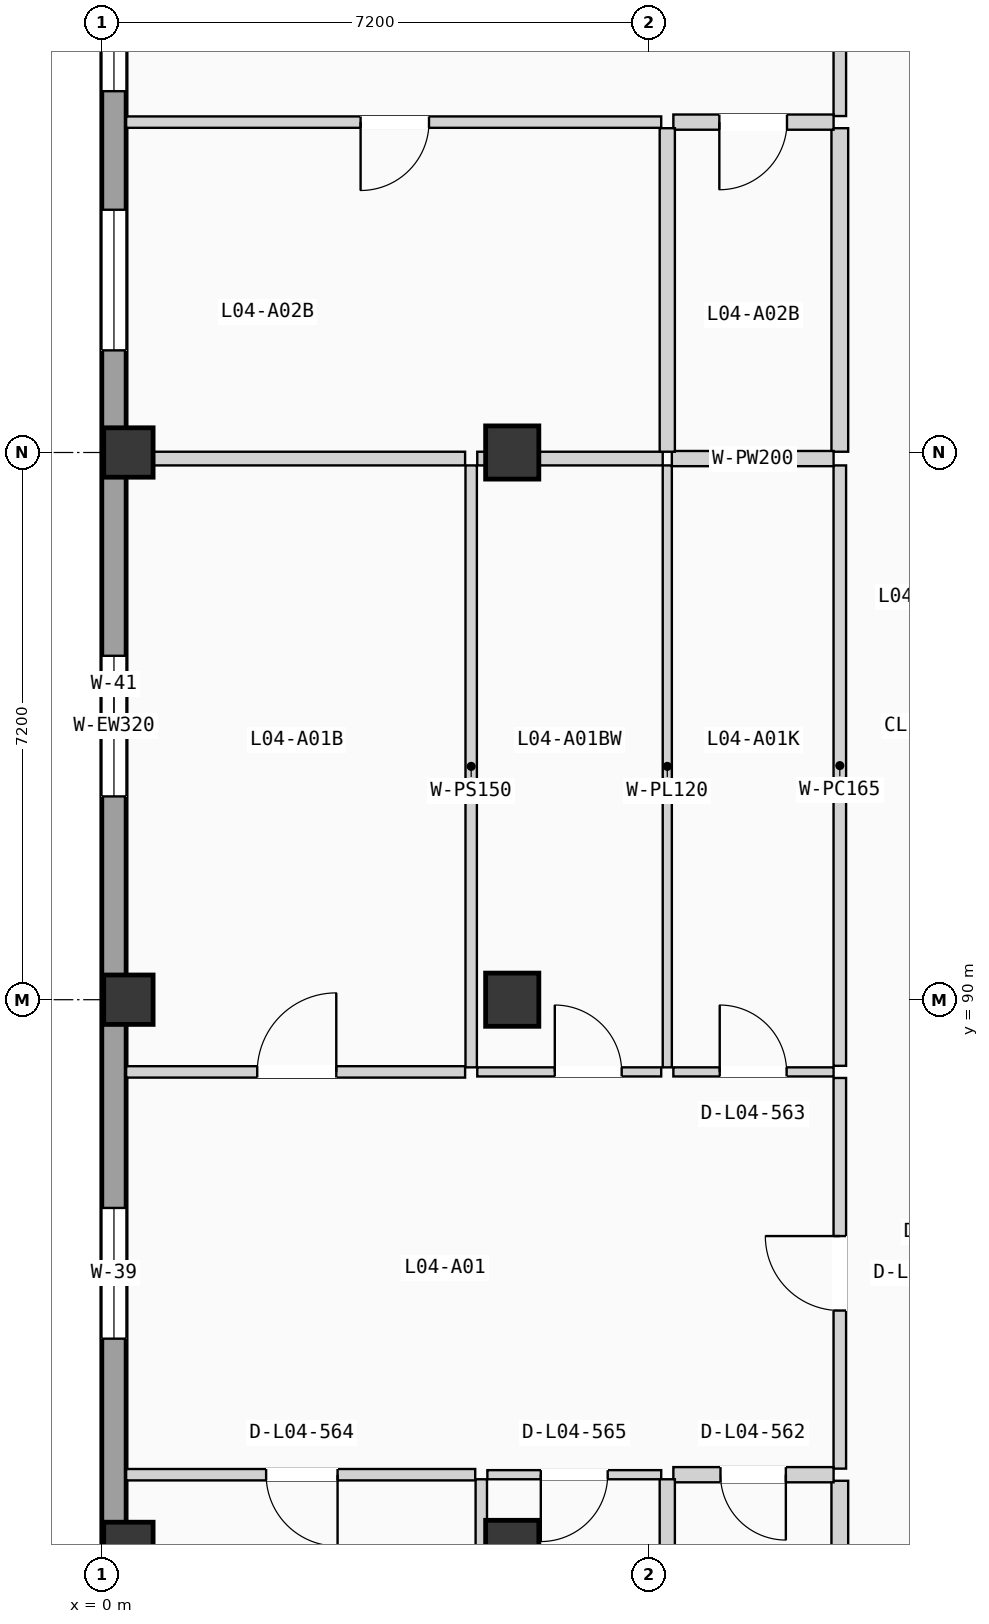
"""IFC4 building model, lengths in metres.
Left out: names, types, materials, properties, quantities, classifications, styles, units other than length and angle.
Written with IfcOpenShell. Run it as: python <this file> out.ifc"""

import sys

from ifc_helpers import new_model, si_unit, direction, frame, frame_2d, origin, origin_2d, place, context, subcontext, project, spatial, rectangle, extrude, element, fill, save


model = new_model("IFC4")
c1 = context("Model", 3, precision=1e-05, world=origin(), true_north=direction((0.0, 1.0)))
c2 = subcontext(c1, "Body", "Model", "MODEL_VIEW")
j1 = project(units=[si_unit("LENGTHUNIT", "METRE"), si_unit("PLANEANGLEUNIT", "RADIAN")], contexts=[c1])
p1 = place(None, origin())
s1 = spatial("IfcSite", under=j1, at=p1, CompositionType="ELEMENT")
p2 = place(p1, origin())
s2 = spatial("IfcBuilding", under=s1, at=p2, CompositionType="ELEMENT")
p3 = place(p2, frame((0.0, 0.0, 15.225)))
s3 = spatial("IfcBuildingStorey", under=s2, at=p3, CompositionType="ELEMENT", Elevation=15.225)
for number, where, z_axis, x_axis in (
    (1, (0.35, 82.8, 0.0), (0.0, 0.0, 1.0), (1.0, 0.0, 0.0)),
    (2, (0.35, 90.0, 0.0), (0.0, 0.0, 1.0), (1.0, 0.0, 0.0)),
    (3, (0.35, 97.2, 0.0), (0.0, 0.0, 1.0), (1.0, 0.0, 0.0)),
):
    element("IfcColumn", number, at=place(p3, frame(where, z_axis=z_axis, x_axis=x_axis)), inside=s3, PredefinedType="COLUMN", context=c2, shape_type="SweptSolid", body=[
        extrude(rectangle(XDim=0.65, YDim=0.65, at=origin_2d()), origin(), (0.0, 0.0, 1.0), 3.15),
    ])
for number, where, z_axis, x_axis in (
    (4, (5.4, 82.8, 0.0), (0.0, 0.0, 1.0), (1.0, 0.0, 0.0)),
    (5, (5.4, 90.0, 0.0), (0.0, 0.0, 1.0), (1.0, 0.0, 0.0)),
    (6, (5.4, 97.2, 0.0), (0.0, 0.0, 1.0), (1.0, 0.0, 0.0)),
):
    element("IfcColumn", number, at=place(p3, frame(where, z_axis=z_axis, x_axis=x_axis)), inside=s3, PredefinedType="COLUMN", context=c2, shape_type="SweptSolid", body=[
        extrude(rectangle(XDim=0.7, YDim=0.7, at=origin_2d()), origin(), (0.0, 0.0, 1.0), 3.15),
    ])
p4 = place(p3, frame((0.16, 68.72, 0.0), z_axis=(0.0, 0.0, 1.0), x_axis=(0.0, 1.0, 0.0)))
e7 = element("IfcWall", 7, at=p4, inside=s3, PredefinedType="SOLIDWALL", context=c2, shape_type="SweptSolid", body=[
    extrude(rectangle(XDim=49.76, YDim=0.32, at=frame_2d((24.88, 0.0))), origin(), (0.0, 0.0, 1.0), 2.89),
])
p5 = place(p4, frame((16.82, 0.0, 0.555)))
e8 = element("IfcOpeningElement", 8, at=p5, cuts=e7, PredefinedType="OPENING", context=c2, shape_type="SweptSolid", body=[
    extrude(rectangle(XDim=1.72, YDim=1.65, at=frame_2d((0.86, 0.825))), frame((0.0, 0.17, 0.0), z_axis=(0.0, -1.0, 0.0), x_axis=(1.0, 0.0, 0.0)), (0.0, 0.0, 1.0), 0.34),
])
p6 = place(p4, frame((10.07, 0.0, 0.85)))
e9 = element("IfcOpeningElement", 9, at=p6, cuts=e7, PredefinedType="OPENING", context=c2, shape_type="SweptSolid", body=[
    extrude(rectangle(XDim=0.95, YDim=1.2, at=frame_2d((0.475, 0.6))), frame((0.0, 0.17, 0.0), z_axis=(0.0, -1.0, 0.0), x_axis=(1.0, 0.0, 0.0)), (0.0, 0.0, 1.0), 0.34),
])
p7 = place(p4, frame((23.955, 0.0, 0.9)))
e10 = element("IfcOpeningElement", 10, at=p7, cuts=e7, PredefinedType="OPENING", context=c2, shape_type="SweptSolid", body=[
    extrude(rectangle(XDim=1.85, YDim=1.2, at=frame_2d((0.925, 0.6))), frame((0.0, 0.17, 0.0), z_axis=(0.0, -1.0, 0.0), x_axis=(1.0, 0.0, 0.0)), (0.0, 0.0, 1.0), 0.34),
])
p8 = place(p4, frame((33.234, 0.0, 0.855)))
e11 = element("IfcOpeningElement", 11, at=p8, cuts=e7, PredefinedType="OPENING", context=c2, shape_type="SweptSolid", body=[
    extrude(rectangle(XDim=1.85, YDim=1.35, at=frame_2d((0.925, 0.675))), frame((0.0, 0.17, 0.0), z_axis=(0.0, -1.0, 0.0), x_axis=(1.0, 0.0, 0.0)), (0.0, 0.0, 1.0), 0.34),
])
p9 = place(p4, frame((29.824, 0.0, 0.705)))
e12 = element("IfcOpeningElement", 12, at=p9, cuts=e7, PredefinedType="OPENING", context=c2, shape_type="SweptSolid", body=[
    extrude(rectangle(XDim=1.85, YDim=1.5, at=frame_2d((0.925, 0.75))), frame((0.0, 0.17, 0.0), z_axis=(0.0, -1.0, 0.0), x_axis=(1.0, 0.0, 0.0)), (0.0, 0.0, 1.0), 0.34),
])
p10 = place(p4, frame((39.427, 0.0, 0.555)))
e13 = element("IfcOpeningElement", 13, at=p10, cuts=e7, PredefinedType="OPENING", context=c2, shape_type="SweptSolid", body=[
    extrude(rectangle(XDim=1.85, YDim=1.65, at=frame_2d((0.925, 0.825))), frame((0.0, 0.17, 0.0), z_axis=(0.0, -1.0, 0.0), x_axis=(1.0, 0.0, 0.0)), (0.0, 0.0, 1.0), 0.34),
])
p11 = place(p3, frame((9.71, 83.83, 0.0), z_axis=(0.0, 0.0, 1.0), x_axis=(0.0, 1.0, 0.0)))
e14 = element("IfcWall", 14, at=p11, inside=s3, PredefinedType="PARTITIONING", context=c2, shape_type="SweptSolid", body=[
    extrude(rectangle(XDim=5.14, YDim=0.165, at=frame_2d((2.57, 0.0))), origin(), (0.0, 0.0, 1.0), 2.87),
])
p12 = place(p11, frame((2.08, 0.0, 0.0)))
e15 = element("IfcOpeningElement", 15, at=p12, cuts=e14, PredefinedType="OPENING", context=c2, shape_type="SweptSolid", body=[
    extrude(rectangle(XDim=0.98, YDim=2.08, at=frame_2d((0.49, 1.04))), frame((0.0, 0.093, 0.0), z_axis=(0.0, -1.0, 0.0), x_axis=(1.0, 0.0, 0.0)), (0.0, 0.0, 1.0), 0.185),
])
p13 = place(p3, frame((9.71, 76.0, 0.0), z_axis=(0.0, 0.0, 1.0), x_axis=(0.0, 1.0, 0.0)))
e16 = element("IfcWall", 16, at=p13, inside=s3, PredefinedType="PLUMBINGWALL", context=c2, shape_type="SweptSolid", body=[
    extrude(rectangle(XDim=7.67, YDim=0.22, at=frame_2d((3.835, 0.0))), origin(), (0.0, 0.0, 1.0), 2.87),
])
p14 = place(p3, frame((9.71, 89.13, 0.0), z_axis=(0.0, 0.0, 1.0), x_axis=(0.0, 1.0, 0.0)))
e17 = element("IfcWall", 17, at=p14, inside=s3, PredefinedType="PARTITIONING", context=c2, shape_type="SweptSolid", body=[
    extrude(rectangle(XDim=7.9, YDim=0.165, at=frame_2d((3.95, 0.0))), origin(), (0.0, 0.0, 1.0), 2.87),
])
p15 = place(p3, frame((9.71, 101.627, 0.0), z_axis=(0.0, 0.0, 1.0), x_axis=(0.0, 1.0, 0.0)))
e18 = element("IfcWall", 18, at=p15, inside=s3, PredefinedType="PARTITIONING", context=c2, shape_type="SweptSolid", body=[
    extrude(rectangle(XDim=5.156, YDim=0.165, at=frame_2d((2.578, 0.0))), origin(), (0.0, 0.0, 1.0), 2.87),
])
p16 = place(p15, frame((2.088, 0.0, 0.0)))
e19 = element("IfcOpeningElement", 19, at=p16, cuts=e18, PredefinedType="OPENING", context=c2, shape_type="SweptSolid", body=[
    extrude(rectangle(XDim=0.98, YDim=2.08, at=frame_2d((0.49, 1.04))), frame((0.0, 0.093, 0.0), z_axis=(0.0, -1.0, 0.0), x_axis=(1.0, 0.0, 0.0)), (0.0, 0.0, 1.0), 0.185),
])
p17 = place(p3, frame((9.71, 97.21, 0.0), z_axis=(0.0, 0.0, 1.0), x_axis=(0.0, 1.0, 0.0)))
e20 = element("IfcWall", 20, at=p17, inside=s3, PredefinedType="PLUMBINGWALL", context=c2, shape_type="SweptSolid", body=[
    extrude(rectangle(XDim=4.257, YDim=0.22, at=frame_2d((2.128, 0.0))), origin(), (0.0, 0.0, 1.0), 2.87),
])
p18 = place(p3, frame((7.52, 83.75, 0.0), z_axis=(0.0, 0.0, 1.0), x_axis=(1.0, 0.0, 0.0)))
e21 = element("IfcWall", 21, at=p18, inside=s3, PredefinedType="PLUMBINGWALL", context=c2, shape_type="SweptSolid", body=[
    extrude(rectangle(XDim=2.108, YDim=0.2, at=frame_2d((1.054, 0.0))), origin(), (0.0, 0.0, 1.0), 2.87),
])
p19 = place(p18, frame((0.62, 0.0, 0.0)))
e22 = element("IfcOpeningElement", 22, at=p19, cuts=e21, PredefinedType="OPENING", context=c2, shape_type="SweptSolid", body=[
    extrude(rectangle(XDim=0.86, YDim=2.0, at=frame_2d((0.43, 1.0))), frame((0.0, 0.11, 0.0), z_axis=(0.0, -1.0, 0.0), x_axis=(1.0, 0.0, 0.0)), (0.0, 0.0, 1.0), 0.22),
])
p20 = place(p3, frame((7.52, 89.05, 0.0), z_axis=(0.0, 0.0, 1.0), x_axis=(1.0, 0.0, 0.0)))
e23 = element("IfcWall", 23, at=p20, inside=s3, PredefinedType="PARTITIONING", context=c2, shape_type="SweptSolid", body=[
    extrude(rectangle(XDim=2.108, YDim=0.12, at=frame_2d((1.054, 0.0))), origin(), (0.0, 0.0, 1.0), 2.87),
])
p21 = place(p20, frame((0.61, 0.0, 0.0)))
e24 = element("IfcOpeningElement", 24, at=p21, cuts=e23, PredefinedType="OPENING", context=c2, shape_type="SweptSolid", body=[
    extrude(rectangle(XDim=0.88, YDim=2.02, at=frame_2d((0.44, 1.01))), frame((0.0, 0.07, 0.0), z_axis=(0.0, -1.0, 0.0), x_axis=(1.0, 0.0, 0.0)), (0.0, 0.0, 1.0), 0.14),
])
p22 = place(p3, frame((0.32, 83.75, 0.0), z_axis=(0.0, 0.0, 1.0), x_axis=(1.0, 0.0, 0.0)))
e25 = element("IfcWall", 25, at=p22, inside=s3, PredefinedType="PARTITIONING", context=c2, shape_type="SweptSolid", body=[
    extrude(rectangle(XDim=4.593, YDim=0.15, at=frame_2d((2.296, 0.0))), origin(), (0.0, 0.0, 1.0), 2.87),
])
p23 = place(p22, frame((1.842, 0.0, 0.0)))
e26 = element("IfcOpeningElement", 26, at=p23, cuts=e25, PredefinedType="OPENING", context=c2, shape_type="SweptSolid", body=[
    extrude(rectangle(XDim=0.94, YDim=2.06, at=frame_2d((0.47, 1.03))), frame((0.0, 0.085, 0.0), z_axis=(0.0, -1.0, 0.0), x_axis=(1.0, 0.0, 0.0)), (0.0, 0.0, 1.0), 0.17),
])
p24 = place(p3, frame((5.073, 83.75, 0.0), z_axis=(0.0, 0.0, 1.0), x_axis=(1.0, 0.0, 0.0)))
e27 = element("IfcWall", 27, at=p24, inside=s3, PredefinedType="PARTITIONING", context=c2, shape_type="SweptSolid", body=[
    extrude(rectangle(XDim=2.287, YDim=0.12, at=frame_2d((1.144, 0.0))), origin(), (0.0, 0.0, 1.0), 2.87),
])
p25 = place(p24, frame((0.703, 0.0, 0.0)))
e28 = element("IfcOpeningElement", 28, at=p25, cuts=e27, PredefinedType="OPENING", context=c2, shape_type="SweptSolid", body=[
    extrude(rectangle(XDim=0.88, YDim=2.02, at=frame_2d((0.44, 1.01))), frame((0.0, 0.07, 0.0), z_axis=(0.0, -1.0, 0.0), x_axis=(1.0, 0.0, 0.0)), (0.0, 0.0, 1.0), 0.14),
])
p26 = place(p3, frame((0.32, 89.05, 0.0), z_axis=(0.0, 0.0, 1.0), x_axis=(1.0, 0.0, 0.0)))
e29 = element("IfcWall", 29, at=p26, inside=s3, PredefinedType="PARTITIONING", context=c2, shape_type="SweptSolid", body=[
    extrude(rectangle(XDim=4.46, YDim=0.15, at=frame_2d((2.23, 0.0))), origin(), (0.0, 0.0, 1.0), 2.87),
])
p27 = place(p26, frame((1.725, 0.0, 0.0)))
e30 = element("IfcOpeningElement", 30, at=p27, cuts=e29, PredefinedType="OPENING", context=c2, shape_type="SweptSolid", body=[
    extrude(rectangle(XDim=1.04, YDim=2.08, at=frame_2d((0.52, 1.04))), frame((0.0, 0.085, 0.0), z_axis=(0.0, -1.0, 0.0), x_axis=(1.0, 0.0, 0.0)), (0.0, 0.0, 1.0), 0.17),
])
p28 = place(p3, frame((4.94, 89.05, 0.0), z_axis=(0.0, 0.0, 1.0), x_axis=(1.0, 0.0, 0.0)))
e31 = element("IfcWall", 31, at=p28, inside=s3, PredefinedType="PARTITIONING", context=c2, shape_type="SweptSolid", body=[
    extrude(rectangle(XDim=2.42, YDim=0.12, at=frame_2d((1.21, 0.0))), origin(), (0.0, 0.0, 1.0), 2.87),
])
p29 = place(p28, frame((1.02, 0.0, 0.0)))
e32 = element("IfcOpeningElement", 32, at=p29, cuts=e31, PredefinedType="OPENING", context=c2, shape_type="SweptSolid", body=[
    extrude(rectangle(XDim=0.88, YDim=2.02, at=frame_2d((0.44, 1.01))), frame((0.0, 0.07, 0.0), z_axis=(0.0, -1.0, 0.0), x_axis=(1.0, 0.0, 0.0)), (0.0, 0.0, 1.0), 0.14),
])
p30 = place(p3, frame((7.44, 76.0, 0.0), z_axis=(0.0, 0.0, 1.0), x_axis=(0.0, 1.0, 0.0)))
e33 = element("IfcWall", 33, at=p30, inside=s3, PredefinedType="PLUMBINGWALL", context=c2, shape_type="SweptSolid", body=[
    extrude(rectangle(XDim=7.69, YDim=0.2, at=frame_2d((3.845, 0.0))), origin(), (0.0, 0.0, 1.0), 2.87),
])
p31 = place(p30, frame((3.41, 0.0, 0.0)))
e34 = element("IfcOpeningElement", 34, at=p31, cuts=e33, PredefinedType="OPENING", context=c2, shape_type="SweptSolid", body=[
    extrude(rectangle(XDim=0.85, YDim=2.01, at=frame_2d((0.425, 1.005))), frame((0.0, 0.11, 0.0), z_axis=(0.0, -1.0, 0.0), x_axis=(1.0, 0.0, 0.0)), (0.0, 0.0, 1.0), 0.22),
])
p32 = place(p3, frame((7.44, 89.11, 0.0), z_axis=(0.0, 0.0, 1.0), x_axis=(0.0, 1.0, 0.0)))
e35 = element("IfcWall", 35, at=p32, inside=s3, PredefinedType="PARTITIONING", context=c2, shape_type="SweptSolid", body=[
    extrude(rectangle(XDim=7.92, YDim=0.12, at=frame_2d((3.96, 0.0))), origin(), (0.0, 0.0, 1.0), 2.87),
])
p33 = place(p3, frame((7.5, 97.12, 0.0), z_axis=(0.0, 0.0, 1.0), x_axis=(1.0, 0.0, 0.0)))
e36 = element("IfcWall", 36, at=p33, inside=s3, PredefinedType="PLUMBINGWALL", context=c2, shape_type="SweptSolid", body=[
    extrude(rectangle(XDim=2.128, YDim=0.2, at=frame_2d((1.064, 0.0))), origin(), (0.0, 0.0, 1.0), 2.16),
])
p34 = place(p3, frame((4.993, 76.0, 0.0), z_axis=(0.0, 0.0, 1.0), x_axis=(0.0, 1.0, 0.0)))
e37 = element("IfcWall", 37, at=p34, inside=s3, PredefinedType="PARTITIONING", context=c2, shape_type="SweptSolid", body=[
    extrude(rectangle(XDim=7.69, YDim=0.15, at=frame_2d((3.845, 0.0))), origin(), (0.0, 0.0, 1.0), 2.87),
])
p35 = place(p3, frame((4.86, 89.11, 0.0), z_axis=(0.0, 0.0, 1.0), x_axis=(0.0, 1.0, 0.0)))
e38 = element("IfcWall", 38, at=p35, inside=s3, PredefinedType="PARTITIONING", context=c2, shape_type="SweptSolid", body=[
    extrude(rectangle(XDim=7.92, YDim=0.15, at=frame_2d((3.96, 0.0))), origin(), (0.0, 0.0, 1.0), 2.87),
])
p36 = place(p3, frame((0.32, 97.12, 0.0), z_axis=(0.0, 0.0, 1.0), x_axis=(1.0, 0.0, 0.0)))
e39 = element("IfcWall", 39, at=p36, inside=s3, PredefinedType="PARTITIONING", context=c2, shape_type="SweptSolid", body=[
    extrude(rectangle(XDim=4.46, YDim=0.18, at=frame_2d((2.23, 0.0))), origin(), (0.0, 0.0, 1.0), 2.21),
])
p37 = place(p3, frame((4.94, 97.12, 0.0), z_axis=(0.0, 0.0, 1.0), x_axis=(1.0, 0.0, 0.0)))
e40 = element("IfcWall", 40, at=p37, inside=s3, PredefinedType="PARTITIONING", context=c2, shape_type="SweptSolid", body=[
    extrude(rectangle(XDim=2.44, YDim=0.18, at=frame_2d((1.22, 0.0))), origin(), (0.0, 0.0, 1.0), 2.16),
])
p38 = place(p3, frame((7.52, 101.547, 0.0), z_axis=(0.0, 0.0, 1.0), x_axis=(1.0, 0.0, 0.0)))
e41 = element("IfcWall", 41, at=p38, inside=s3, PredefinedType="PLUMBINGWALL", context=c2, shape_type="SweptSolid", body=[
    extrude(rectangle(XDim=2.108, YDim=0.2, at=frame_2d((1.054, 0.0))), origin(), (0.0, 0.0, 1.0), 2.87),
])
p39 = place(p38, frame((0.605, 0.0, 0.0)))
e42 = element("IfcOpeningElement", 42, at=p39, cuts=e41, PredefinedType="OPENING", context=c2, shape_type="SweptSolid", body=[
    extrude(rectangle(XDim=0.89, YDim=2.03, at=frame_2d((0.445, 1.015))), frame((0.0, 0.11, 0.0), z_axis=(0.0, -1.0, 0.0), x_axis=(1.0, 0.0, 0.0)), (0.0, 0.0, 1.0), 0.22),
])
p40 = place(p3, frame((0.32, 101.547, 0.0), z_axis=(0.0, 0.0, 1.0), x_axis=(1.0, 0.0, 0.0)))
e43 = element("IfcWall", 43, at=p40, inside=s3, PredefinedType="PARTITIONING", context=c2, shape_type="SweptSolid", body=[
    extrude(rectangle(XDim=7.04, YDim=0.15, at=frame_2d((3.52, 0.0))), origin(), (0.0, 0.0, 1.0), 2.87),
])
p41 = place(p40, frame((3.085, 0.0, 0.0)))
e44 = element("IfcOpeningElement", 44, at=p41, cuts=e43, PredefinedType="OPENING", context=c2, shape_type="SweptSolid", body=[
    extrude(rectangle(XDim=0.9, YDim=2.04, at=frame_2d((0.45, 1.02))), frame((0.0, 0.085, 0.0), z_axis=(0.0, -1.0, 0.0), x_axis=(1.0, 0.0, 0.0)), (0.0, 0.0, 1.0), 0.17),
])
p42 = place(p3, frame((7.44, 97.21, 0.0), z_axis=(0.0, 0.0, 1.0), x_axis=(0.0, 1.0, 0.0)))
e45 = element("IfcWall", 45, at=p42, inside=s3, PredefinedType="PLUMBINGWALL", context=c2, shape_type="SweptSolid", body=[
    extrude(rectangle(XDim=4.257, YDim=0.2, at=frame_2d((2.128, 0.0))), origin(), (0.0, 0.0, 1.0), 2.87),
])
p43 = place(p5, origin())
e46 = element("IfcWindow", 46, at=p43, inside=s3, PartitioningType="DOUBLE_PANEL_VERTICAL", PredefinedType="WINDOW", context=c2, shape_type="SweptSolid", body=[
    extrude(rectangle(XDim=1.72, YDim=1.65, at=frame_2d((0.86, 0.825))), frame((0.0, 0.03, 0.0), z_axis=(0.0, -1.0, 0.0), x_axis=(1.0, 0.0, 0.0)), (0.0, 0.0, 1.0), 0.06),
])
fill(e8, e46)
p44 = place(p7, origin())
e47 = element("IfcWindow", 47, at=p44, inside=s3, PartitioningType="DOUBLE_PANEL_VERTICAL", PredefinedType="WINDOW", context=c2, shape_type="SweptSolid", body=[
    extrude(rectangle(XDim=1.85, YDim=1.2, at=frame_2d((0.925, 0.6))), frame((0.0, 0.03, 0.0), z_axis=(0.0, -1.0, 0.0), x_axis=(1.0, 0.0, 0.0)), (0.0, 0.0, 1.0), 0.06),
])
fill(e10, e47)
p45 = place(p8, origin())
e48 = element("IfcWindow", 48, at=p45, inside=s3, PartitioningType="DOUBLE_PANEL_VERTICAL", PredefinedType="WINDOW", context=c2, shape_type="SweptSolid", body=[
    extrude(rectangle(XDim=1.85, YDim=1.35, at=frame_2d((0.925, 0.675))), frame((0.0, 0.03, 0.0), z_axis=(0.0, -1.0, 0.0), x_axis=(1.0, 0.0, 0.0)), (0.0, 0.0, 1.0), 0.06),
])
fill(e11, e48)
p46 = place(p9, origin())
e49 = element("IfcWindow", 49, at=p46, inside=s3, PartitioningType="DOUBLE_PANEL_VERTICAL", PredefinedType="WINDOW", context=c2, shape_type="SweptSolid", body=[
    extrude(rectangle(XDim=1.85, YDim=1.5, at=frame_2d((0.925, 0.75))), frame((0.0, 0.03, 0.0), z_axis=(0.0, -1.0, 0.0), x_axis=(1.0, 0.0, 0.0)), (0.0, 0.0, 1.0), 0.06),
])
fill(e12, e49)
p47 = place(p12, origin())
e50 = element("IfcDoor", 50, at=p47, inside=s3, OperationType="SINGLE_SWING_RIGHT", PredefinedType="DOOR", context=c2, shape_type="SweptSolid", body=[
    extrude(rectangle(XDim=0.98, YDim=2.08, at=frame_2d((0.49, 1.04))), frame((0.0, 0.025, 0.0), z_axis=(0.0, -1.0, 0.0), x_axis=(1.0, 0.0, 0.0)), (0.0, 0.0, 1.0), 0.05),
])
fill(e15, e50)
p48 = place(p19, frame((0.86, 0.0, 0.0), z_axis=(0.0, 0.0, 1.0), x_axis=(-1.0, 0.0, 0.0)))
e51 = element("IfcDoor", 51, at=p48, inside=s3, OperationType="SINGLE_SWING_RIGHT", PredefinedType="DOOR", context=c2, shape_type="SweptSolid", body=[
    extrude(rectangle(XDim=0.86, YDim=2.0, at=frame_2d((0.43, 1.0))), frame((0.0, 0.025, 0.0), z_axis=(0.0, -1.0, 0.0), x_axis=(1.0, 0.0, 0.0)), (0.0, 0.0, 1.0), 0.05),
])
fill(e22, e51)
p49 = place(p21, origin())
e52 = element("IfcDoor", 52, at=p49, inside=s3, OperationType="SINGLE_SWING_LEFT", PredefinedType="DOOR", context=c2, shape_type="SweptSolid", body=[
    extrude(rectangle(XDim=0.88, YDim=2.02, at=frame_2d((0.44, 1.01))), frame((0.0, 0.025, 0.0), z_axis=(0.0, -1.0, 0.0), x_axis=(1.0, 0.0, 0.0)), (0.0, 0.0, 1.0), 0.05),
])
fill(e24, e52)
p50 = place(p23, frame((0.94, 0.0, 0.0), z_axis=(0.0, 0.0, 1.0), x_axis=(-1.0, 0.0, 0.0)))
e53 = element("IfcDoor", 53, at=p50, inside=s3, OperationType="SINGLE_SWING_RIGHT", PredefinedType="DOOR", context=c2, shape_type="SweptSolid", body=[
    extrude(rectangle(XDim=0.94, YDim=2.06, at=frame_2d((0.47, 1.03))), frame((0.0, 0.025, 0.0), z_axis=(0.0, -1.0, 0.0), x_axis=(1.0, 0.0, 0.0)), (0.0, 0.0, 1.0), 0.05),
])
fill(e26, e53)
p51 = place(p25, frame((0.88, 0.0, 0.0), z_axis=(0.0, 0.0, 1.0), x_axis=(-1.0, 0.0, 0.0)))
e54 = element("IfcDoor", 54, at=p51, inside=s3, OperationType="SINGLE_SWING_LEFT", PredefinedType="DOOR", context=c2, shape_type="SweptSolid", body=[
    extrude(rectangle(XDim=0.88, YDim=2.02, at=frame_2d((0.44, 1.01))), frame((0.0, 0.025, 0.0), z_axis=(0.0, -1.0, 0.0), x_axis=(1.0, 0.0, 0.0)), (0.0, 0.0, 1.0), 0.05),
])
fill(e28, e54)
p52 = place(p27, origin())
e55 = element("IfcDoor", 55, at=p52, inside=s3, OperationType="SINGLE_SWING_RIGHT", PredefinedType="DOOR", context=c2, shape_type="SweptSolid", body=[
    extrude(rectangle(XDim=1.04, YDim=2.08, at=frame_2d((0.52, 1.04))), frame((0.0, 0.025, 0.0), z_axis=(0.0, -1.0, 0.0), x_axis=(1.0, 0.0, 0.0)), (0.0, 0.0, 1.0), 0.05),
])
fill(e30, e55)
p53 = place(p29, origin())
e56 = element("IfcDoor", 56, at=p53, inside=s3, OperationType="SINGLE_SWING_LEFT", PredefinedType="DOOR", context=c2, shape_type="SweptSolid", body=[
    extrude(rectangle(XDim=0.88, YDim=2.02, at=frame_2d((0.44, 1.01))), frame((0.0, 0.025, 0.0), z_axis=(0.0, -1.0, 0.0), x_axis=(1.0, 0.0, 0.0)), (0.0, 0.0, 1.0), 0.05),
])
fill(e32, e56)
p54 = place(p39, frame((0.89, 0.0, 0.0), z_axis=(0.0, 0.0, 1.0), x_axis=(-1.0, 0.0, 0.0)))
e57 = element("IfcDoor", 57, at=p54, inside=s3, OperationType="SINGLE_SWING_LEFT", PredefinedType="DOOR", context=c2, shape_type="SweptSolid", body=[
    extrude(rectangle(XDim=0.89, YDim=2.03, at=frame_2d((0.445, 1.015))), frame((0.0, 0.025, 0.0), z_axis=(0.0, -1.0, 0.0), x_axis=(1.0, 0.0, 0.0)), (0.0, 0.0, 1.0), 0.05),
])
fill(e42, e57)
p55 = place(p41, frame((0.9, 0.0, 0.0), z_axis=(0.0, 0.0, 1.0), x_axis=(-1.0, 0.0, 0.0)))
e58 = element("IfcDoor", 58, at=p55, inside=s3, OperationType="SINGLE_SWING_LEFT", PredefinedType="DOOR", context=c2, shape_type="SweptSolid", body=[
    extrude(rectangle(XDim=0.9, YDim=2.04, at=frame_2d((0.45, 1.02))), frame((0.0, 0.025, 0.0), z_axis=(0.0, -1.0, 0.0), x_axis=(1.0, 0.0, 0.0)), (0.0, 0.0, 1.0), 0.05),
])
fill(e44, e58)
save(model, sys.argv[1])
